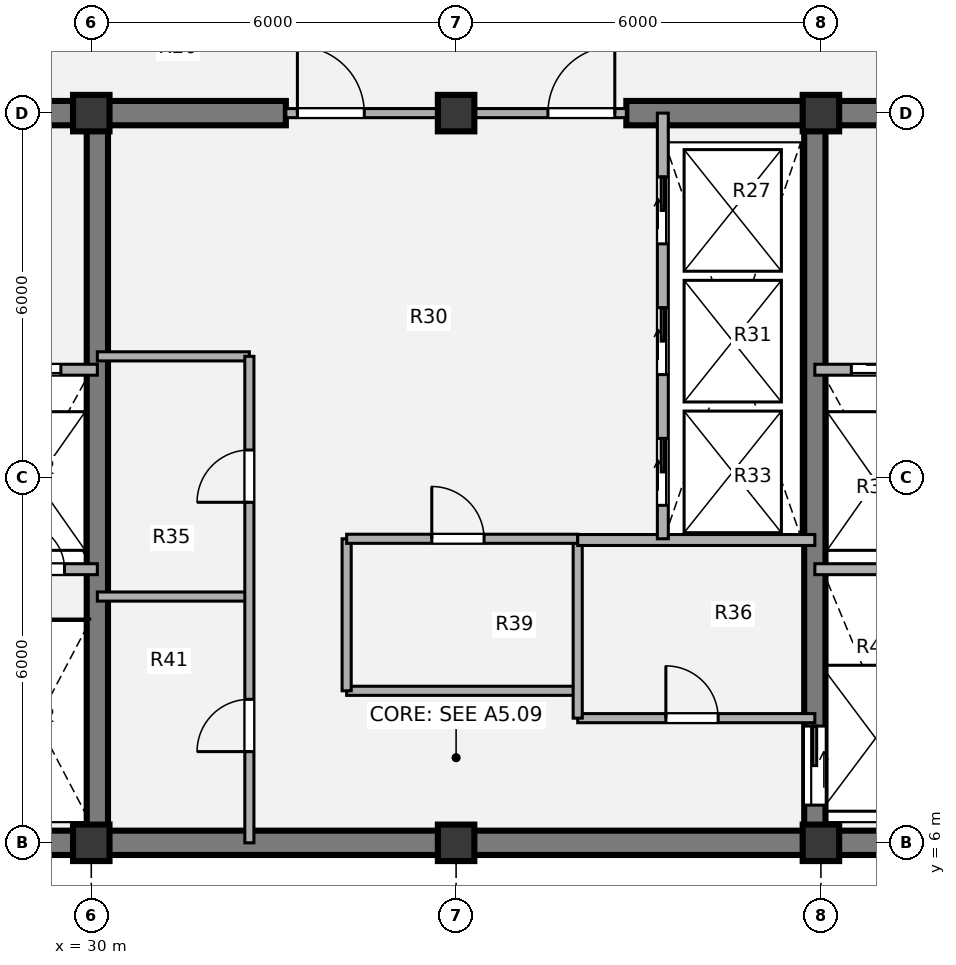
"""IFC4 building model, lengths in metres.
Left out: names, types, materials, properties, quantities, classifications, styles, units other than length and angle.
Written with IfcOpenShell. Run it as: python <this file> out.ifc"""

import sys

from ifc_helpers import new_model, si_unit, direction, frame, frame_2d, origin, origin_2d, place, context, subcontext, project, spatial, rectangle, extrude, source, transform, mapped, element, fill, save


model = new_model("IFC4")
c1 = context("Model", 3, precision=1e-05, world=origin(), true_north=direction((0.0, 1.0)))
c2 = subcontext(c1, "Body", "Model", "MODEL_VIEW")
j1 = project(units=[si_unit("LENGTHUNIT", "METRE"), si_unit("PLANEANGLEUNIT", "RADIAN")], contexts=[c1])
p1 = place(None, origin())
s1 = spatial("IfcSite", under=j1, at=p1, CompositionType="ELEMENT")
p2 = place(p1, origin())
s2 = spatial("IfcBuilding", under=s1, at=p2, CompositionType="ELEMENT")
p3 = place(p2, frame((0.0, 0.0, 234.36)))
s3 = spatial("IfcBuildingStorey", under=s2, at=p3, CompositionType="ELEMENT", Elevation=234.36)
m1 = source(origin(), c2, "Body", "SweptSolid", [
    extrude(rectangle(XDim=0.6, YDim=0.6, at=origin_2d()), origin(), (0.0, 0.0, 1.0), 3.78),
])
for number, where, z_axis, x_axis in (
    (1, (30.0, 6.0, 0.0), (0.0, 0.0, 1.0), (1.0, 0.0, 0.0)),
    (2, (36.0, 6.0, 0.0), (0.0, 0.0, 1.0), (1.0, 0.0, 0.0)),
    (3, (42.0, 6.0, 0.0), (0.0, 0.0, 1.0), (1.0, 0.0, 0.0)),
    (4, (30.0, 18.0, 0.0), (0.0, 0.0, 1.0), (1.0, 0.0, 0.0)),
    (5, (36.0, 18.0, 0.0), (0.0, 0.0, 1.0), (1.0, 0.0, 0.0)),
    (6, (42.0, 18.0, 0.0), (0.0, 0.0, 1.0), (1.0, 0.0, 0.0)),
):
    element("IfcColumn", number, at=place(p3, frame(where, z_axis=z_axis, x_axis=x_axis)), inside=s3, PredefinedType="COLUMN", context=c2, shape_type="MappedRepresentation", body=[
        mapped(m1, transform((0.0, 0.0, 0.0), x_axis=(1.0, 0.0, 0.0), y_axis=(0.0, 1.0, 0.0), z_axis=(0.0, 0.0, 1.0), scale=1.0)),
    ])
p4 = place(p3, frame((48.2, 6.0, 0.0), z_axis=(0.0, 0.0, 1.0), x_axis=(-1.0, 0.0, 0.0)))
e7 = element("IfcWall", 7, at=p4, inside=s3, PredefinedType="SHEAR", context=c2, shape_type="SweptSolid", body=[
    extrude(rectangle(XDim=24.4, YDim=0.4, at=frame_2d((12.2, 0.0))), origin(), (0.0, 0.0, 1.0), 3.78),
])
p5 = place(p3, frame((23.8, 18.0, 0.0), z_axis=(0.0, 0.0, 1.0), x_axis=(1.0, 0.0, 0.0)))
e8 = element("IfcWall", 8, at=p5, inside=s3, PredefinedType="SHEAR", context=c2, shape_type="SweptSolid", body=[
    extrude(rectangle(XDim=9.4, YDim=0.4, at=frame_2d((4.7, 0.0))), origin(), (0.0, 0.0, 1.0), 3.78),
])
p6 = place(p5, frame((2.95, 0.0, 0.0)))
e9 = element("IfcOpeningElement", 9, at=p6, cuts=e8, PredefinedType="OPENING", context=c2, shape_type="SweptSolid", body=[
    extrude(rectangle(XDim=1.1, YDim=2.1, at=origin_2d()), frame((0.55, 0.21, 1.05), z_axis=(0.0, -1.0, 0.0), x_axis=(1.0, 0.0, 0.0)), (0.0, 0.0, 1.0), 0.42),
])
p7 = place(p3, frame((38.8, 18.0, 0.0), z_axis=(0.0, 0.0, 1.0), x_axis=(1.0, 0.0, 0.0)))
e10 = element("IfcWall", 10, at=p7, inside=s3, PredefinedType="SHEAR", context=c2, shape_type="SweptSolid", body=[
    extrude(rectangle(XDim=9.4, YDim=0.4, at=frame_2d((4.7, 0.0))), origin(), (0.0, 0.0, 1.0), 3.78),
])
p8 = place(p7, frame((5.45, 0.0, 0.0)))
e11 = element("IfcOpeningElement", 11, at=p8, cuts=e10, PredefinedType="OPENING", context=c2, shape_type="SweptSolid", body=[
    extrude(rectangle(XDim=1.1, YDim=2.1, at=origin_2d()), frame((0.55, 0.21, 1.05), z_axis=(0.0, -1.0, 0.0), x_axis=(1.0, 0.0, 0.0)), (0.0, 0.0, 1.0), 0.42),
])
p9 = place(p3, frame((30.1, 6.0, 0.0), z_axis=(0.0, 0.0, 1.0), x_axis=(0.0, 1.0, 0.0)))
e12 = element("IfcWall", 12, at=p9, inside=s3, PredefinedType="SHEAR", context=c2, shape_type="SweptSolid", body=[
    extrude(rectangle(XDim=12.0, YDim=0.35, at=frame_2d((6.0, 0.0))), origin(), (0.0, 0.0, 1.0), 3.78),
])
p10 = place(p3, frame((41.9, 18.0, 0.0), z_axis=(0.0, 0.0, 1.0), x_axis=(0.0, -1.0, 0.0)))
e13 = element("IfcWall", 13, at=p10, inside=s3, PredefinedType="SHEAR", context=c2, shape_type="SweptSolid", body=[
    extrude(rectangle(XDim=12.0, YDim=0.35, at=frame_2d((6.0, 0.0))), origin(), (0.0, 0.0, 1.0), 3.78),
])
p11 = place(p10, frame((10.08, 0.0, 0.0)))
e14 = element("IfcOpeningElement", 14, at=p11, cuts=e13, PredefinedType="OPENING", context=c2, shape_type="SweptSolid", body=[
    extrude(rectangle(XDim=1.3, YDim=2.1, at=origin_2d()), frame((0.65, 0.185, 1.05), z_axis=(0.0, -1.0, 0.0), x_axis=(1.0, 0.0, 0.0)), (0.0, 0.0, 1.0), 0.37),
])
p12 = place(p3, frame((30.1, 14.0, 0.0), z_axis=(0.0, 0.0, 1.0), x_axis=(1.0, 0.0, 0.0)))
e15 = element("IfcWall", 15, at=p12, inside=s3, PredefinedType="PARTITIONING", context=c2, shape_type="SweptSolid", body=[
    extrude(rectangle(XDim=2.5, YDim=0.15, at=frame_2d((1.25, 0.0))), origin(), (0.0, 0.0, 1.0), 3.5),
])
p13 = place(p3, frame((34.2, 8.5, 0.0), z_axis=(0.0, 0.0, 1.0), x_axis=(1.0, 0.0, 0.0)))
e16 = element("IfcWall", 16, at=p13, inside=s3, PredefinedType="PARTITIONING", context=c2, shape_type="SweptSolid", body=[
    extrude(rectangle(XDim=3.8, YDim=0.15, at=frame_2d((1.9, 0.0))), origin(), (0.0, 0.0, 1.0), 3.5),
])
p14 = place(p3, frame((38.0, 8.05, 0.0), z_axis=(0.0, 0.0, 1.0), x_axis=(1.0, 0.0, 0.0)))
e17 = element("IfcWall", 17, at=p14, inside=s3, PredefinedType="PARTITIONING", context=c2, shape_type="SweptSolid", body=[
    extrude(rectangle(XDim=3.9, YDim=0.15, at=frame_2d((1.95, 0.0))), origin(), (0.0, 0.0, 1.0), 3.5),
])
p15 = place(p14, frame((1.45, 0.0, 0.0)))
e18 = element("IfcOpeningElement", 18, at=p15, cuts=e17, PredefinedType="OPENING", context=c2, shape_type="SweptSolid", body=[
    extrude(rectangle(XDim=0.86, YDim=2.1, at=origin_2d()), frame((0.43, 0.085, 1.05), z_axis=(0.0, -1.0, 0.0), x_axis=(1.0, 0.0, 0.0)), (0.0, 0.0, 1.0), 0.17),
])
p16 = place(p3, frame((34.2, 8.5, 0.0), z_axis=(0.0, 0.0, 1.0), x_axis=(0.0, 1.0, 0.0)))
e19 = element("IfcWall", 19, at=p16, inside=s3, PredefinedType="PARTITIONING", context=c2, shape_type="SweptSolid", body=[
    extrude(rectangle(XDim=2.5, YDim=0.15, at=frame_2d((1.25, 0.0))), origin(), (0.0, 0.0, 1.0), 3.5),
])
p17 = place(p3, frame((38.0, 8.05, 0.0), z_axis=(0.0, 0.0, 1.0), x_axis=(0.0, 1.0, 0.0)))
e20 = element("IfcWall", 20, at=p17, inside=s3, PredefinedType="PARTITIONING", context=c2, shape_type="SweptSolid", body=[
    extrude(rectangle(XDim=2.95, YDim=0.15, at=frame_2d((1.475, 0.0))), origin(), (0.0, 0.0, 1.0), 3.5),
])
p18 = place(p3, frame((34.2, 11.0, 0.0), z_axis=(0.0, 0.0, 1.0), x_axis=(1.0, 0.0, 0.0)))
e21 = element("IfcWall", 21, at=p18, inside=s3, PredefinedType="PARTITIONING", context=c2, shape_type="SweptSolid", body=[
    extrude(rectangle(XDim=3.8, YDim=0.15, at=frame_2d((1.9, 0.0))), origin(), (0.0, 0.0, 1.0), 3.5),
])
p19 = place(p18, frame((1.4, 0.0, 0.0)))
e22 = element("IfcOpeningElement", 22, at=p19, cuts=e21, PredefinedType="OPENING", context=c2, shape_type="SweptSolid", body=[
    extrude(rectangle(XDim=0.86, YDim=2.1, at=origin_2d()), frame((0.43, 0.085, 1.05), z_axis=(0.0, -1.0, 0.0), x_axis=(1.0, 0.0, 0.0)), (0.0, 0.0, 1.0), 0.17),
])
p20 = place(p3, frame((38.0, 10.98, 0.0), z_axis=(0.0, 0.0, 1.0), x_axis=(1.0, 0.0, 0.0)))
e23 = element("IfcWall", 23, at=p20, inside=s3, PredefinedType="PARTITIONING", context=c2, shape_type="SweptSolid", body=[
    extrude(rectangle(XDim=3.9, YDim=0.18, at=frame_2d((1.95, 0.0))), origin(), (0.0, 0.0, 1.0), 3.5),
])
p21 = place(p3, frame((30.1, 10.05, 0.0), z_axis=(0.0, 0.0, 1.0), x_axis=(1.0, 0.0, 0.0)))
e24 = element("IfcWall", 24, at=p21, inside=s3, PredefinedType="PARTITIONING", context=c2, shape_type="SweptSolid", body=[
    extrude(rectangle(XDim=2.5, YDim=0.15, at=frame_2d((1.25, 0.0))), origin(), (0.0, 0.0, 1.0), 3.5),
])
p22 = place(p3, frame((32.6, 6.0, 0.0), z_axis=(0.0, 0.0, 1.0), x_axis=(0.0, 1.0, 0.0)))
e25 = element("IfcWall", 25, at=p22, inside=s3, PredefinedType="PARTITIONING", context=c2, shape_type="SweptSolid", body=[
    extrude(rectangle(XDim=8.0, YDim=0.15, at=frame_2d((4.0, 0.0))), origin(), (0.0, 0.0, 1.0), 3.5),
])
p23 = place(p22, frame((1.5, 0.0, 0.0)))
e26 = element("IfcOpeningElement", 26, at=p23, cuts=e25, PredefinedType="OPENING", context=c2, shape_type="SweptSolid", body=[
    extrude(rectangle(XDim=0.86, YDim=2.1, at=origin_2d()), frame((0.43, 0.085, 1.05), z_axis=(0.0, -1.0, 0.0), x_axis=(1.0, 0.0, 0.0)), (0.0, 0.0, 1.0), 0.17),
])
p24 = place(p22, frame((5.6, 0.0, 0.0)))
e27 = element("IfcOpeningElement", 27, at=p24, cuts=e25, PredefinedType="OPENING", context=c2, shape_type="SweptSolid", body=[
    extrude(rectangle(XDim=0.86, YDim=2.1, at=origin_2d()), frame((0.43, 0.085, 1.05), z_axis=(0.0, -1.0, 0.0), x_axis=(1.0, 0.0, 0.0)), (0.0, 0.0, 1.0), 0.17),
])
p25 = place(p3, frame((33.2, 18.0, 0.0), z_axis=(0.0, 0.0, 1.0), x_axis=(1.0, 0.0, 0.0)))
e28 = element("IfcWall", 28, at=p25, inside=s3, PredefinedType="PARTITIONING", context=c2, shape_type="SweptSolid", body=[
    extrude(rectangle(XDim=5.6, YDim=0.15, at=frame_2d((2.8, 0.0))), origin(), (0.0, 0.0, 1.0), 2.515),
])
p26 = place(p25, frame((0.19, 0.0, 0.0)))
e29 = element("IfcOpeningElement", 29, at=p26, cuts=e28, PredefinedType="OPENING", context=c2, shape_type="SweptSolid", body=[
    extrude(rectangle(XDim=1.1, YDim=2.1, at=origin_2d()), frame((0.55, 0.085, 1.05), z_axis=(0.0, -1.0, 0.0), x_axis=(1.0, 0.0, 0.0)), (0.0, 0.0, 1.0), 0.17),
])
p27 = place(p25, frame((4.31, 0.0, 0.0)))
e30 = element("IfcOpeningElement", 30, at=p27, cuts=e28, PredefinedType="OPENING", context=c2, shape_type="SweptSolid", body=[
    extrude(rectangle(XDim=1.1, YDim=2.1, at=origin_2d()), frame((0.55, 0.085, 1.05), z_axis=(0.0, -1.0, 0.0), x_axis=(1.0, 0.0, 0.0)), (0.0, 0.0, 1.0), 0.17),
])
p28 = place(p3, frame((24.0, 13.78, 0.0), z_axis=(0.0, 0.0, 1.0), x_axis=(1.0, 0.0, 0.0)))
e31 = element("IfcWall", 31, at=p28, inside=s3, PredefinedType="PARTITIONING", context=c2, shape_type="SweptSolid", body=[
    extrude(rectangle(XDim=6.1, YDim=0.18, at=frame_2d((3.05, 0.0))), origin(), (0.0, 0.0, 1.0), 3.5),
])
p29 = place(p28, frame((1.15, 0.0, 0.0)))
e32 = element("IfcOpeningElement", 32, at=p29, cuts=e31, PredefinedType="OPENING", context=c2, shape_type="SweptSolid", body=[
    extrude(rectangle(XDim=1.1, YDim=2.1, at=origin_2d()), frame((0.55, 0.1, 1.05), z_axis=(0.0, -1.0, 0.0), x_axis=(1.0, 0.0, 0.0)), (0.0, 0.0, 1.0), 0.2),
])
p30 = place(p28, frame((4.4, 0.0, 0.0)))
e33 = element("IfcOpeningElement", 33, at=p30, cuts=e31, PredefinedType="OPENING", context=c2, shape_type="SweptSolid", body=[
    extrude(rectangle(XDim=1.1, YDim=2.1, at=origin_2d()), frame((0.55, 0.1, 1.05), z_axis=(0.0, -1.0, 0.0), x_axis=(1.0, 0.0, 0.0)), (0.0, 0.0, 1.0), 0.2),
])
p31 = place(p3, frame((28.15, 10.5, 0.0), z_axis=(0.0, 0.0, 1.0), x_axis=(1.0, 0.0, 0.0)))
e34 = element("IfcWall", 34, at=p31, inside=s3, PredefinedType="PARTITIONING", context=c2, shape_type="SweptSolid", body=[
    extrude(rectangle(XDim=1.95, YDim=0.18, at=frame_2d((0.975, 0.0))), origin(), (0.0, 0.0, 1.0), 3.5),
])
p32 = place(p31, frame((0.65, 0.0, 0.0)))
e35 = element("IfcOpeningElement", 35, at=p32, cuts=e34, PredefinedType="OPENING", context=c2, shape_type="SweptSolid", body=[
    extrude(rectangle(XDim=0.76, YDim=2.05, at=origin_2d()), frame((0.38, 0.1, 1.025), z_axis=(0.0, -1.0, 0.0), x_axis=(1.0, 0.0, 0.0)), (0.0, 0.0, 1.0), 0.2),
])
p33 = place(p3, frame((41.9, 13.78, 0.0), z_axis=(0.0, 0.0, 1.0), x_axis=(1.0, 0.0, 0.0)))
e36 = element("IfcWall", 36, at=p33, inside=s3, PredefinedType="PARTITIONING", context=c2, shape_type="SweptSolid", body=[
    extrude(rectangle(XDim=6.1, YDim=0.18, at=frame_2d((3.05, 0.0))), origin(), (0.0, 0.0, 1.0), 3.5),
])
p34 = place(p33, frame((0.6, 0.0, 0.0)))
e37 = element("IfcOpeningElement", 37, at=p34, cuts=e36, PredefinedType="OPENING", context=c2, shape_type="SweptSolid", body=[
    extrude(rectangle(XDim=1.1, YDim=2.1, at=origin_2d()), frame((0.55, 0.1, 1.05), z_axis=(0.0, -1.0, 0.0), x_axis=(1.0, 0.0, 0.0)), (0.0, 0.0, 1.0), 0.2),
])
p35 = place(p33, frame((3.8, 0.0, 0.0)))
e38 = element("IfcOpeningElement", 38, at=p35, cuts=e36, PredefinedType="OPENING", context=c2, shape_type="SweptSolid", body=[
    extrude(rectangle(XDim=1.1, YDim=2.1, at=origin_2d()), frame((0.55, 0.1, 1.05), z_axis=(0.0, -1.0, 0.0), x_axis=(1.0, 0.0, 0.0)), (0.0, 0.0, 1.0), 0.2),
])
p36 = place(p3, frame((41.9, 10.5, 0.0), z_axis=(0.0, 0.0, 1.0), x_axis=(1.0, 0.0, 0.0)))
e39 = element("IfcWall", 39, at=p36, inside=s3, PredefinedType="PARTITIONING", context=c2, shape_type="SweptSolid", body=[
    extrude(rectangle(XDim=1.95, YDim=0.18, at=frame_2d((0.975, 0.0))), origin(), (0.0, 0.0, 1.0), 3.5),
])
p37 = place(p3, frame((39.4, 11.0, 0.0), z_axis=(0.0, 0.0, 1.0), x_axis=(0.0, 1.0, 0.0)))
e40 = element("IfcWall", 40, at=p37, inside=s3, PredefinedType="PARTITIONING", context=c2, shape_type="SweptSolid", body=[
    extrude(rectangle(XDim=7.0, YDim=0.18, at=frame_2d((3.5, 0.0))), origin(), (0.0, 0.0, 1.0), 3.5),
])
p38 = place(p37, frame((0.55, 0.0, 0.0)))
e41 = element("IfcOpeningElement", 41, at=p38, cuts=e40, PredefinedType="OPENING", context=c2, shape_type="SweptSolid", body=[
    extrude(rectangle(XDim=1.1, YDim=2.1, at=origin_2d()), frame((0.55, 0.1, 1.05), z_axis=(0.0, -1.0, 0.0), x_axis=(1.0, 0.0, 0.0)), (0.0, 0.0, 1.0), 0.2),
])
p39 = place(p37, frame((2.7, 0.0, 0.0)))
e42 = element("IfcOpeningElement", 42, at=p39, cuts=e40, PredefinedType="OPENING", context=c2, shape_type="SweptSolid", body=[
    extrude(rectangle(XDim=1.1, YDim=2.1, at=origin_2d()), frame((0.55, 0.1, 1.05), z_axis=(0.0, -1.0, 0.0), x_axis=(1.0, 0.0, 0.0)), (0.0, 0.0, 1.0), 0.2),
])
p40 = place(p37, frame((4.85, 0.0, 0.0)))
e43 = element("IfcOpeningElement", 43, at=p40, cuts=e40, PredefinedType="OPENING", context=c2, shape_type="SweptSolid", body=[
    extrude(rectangle(XDim=1.1, YDim=2.1, at=origin_2d()), frame((0.55, 0.1, 1.05), z_axis=(0.0, -1.0, 0.0), x_axis=(1.0, 0.0, 0.0)), (0.0, 0.0, 1.0), 0.2),
])
m2 = source(origin(), c2, "Body", "SweptSolid", [
    extrude(rectangle(XDim=0.86, YDim=2.1, at=origin_2d()), frame((0.43, 0.025, 1.05), z_axis=(0.0, -1.0, 0.0), x_axis=(1.0, 0.0, 0.0)), (0.0, 0.0, 1.0), 0.05),
])
p41 = place(p15, origin())
e44 = element("IfcDoor", 44, at=p41, inside=s3, OperationType="SINGLE_SWING_LEFT", PredefinedType="DOOR", context=c2, shape_type="MappedRepresentation", body=[
    mapped(m2, transform((0.0, 0.0, 0.0), x_axis=(1.0, 0.0, 0.0), y_axis=(0.0, 1.0, 0.0), z_axis=(0.0, 0.0, 1.0), scale=1.0)),
])
fill(e18, e44)
p42 = place(p19, origin())
e45 = element("IfcDoor", 45, at=p42, inside=s3, OperationType="SINGLE_SWING_LEFT", PredefinedType="DOOR", context=c2, shape_type="MappedRepresentation", body=[
    mapped(m2, transform((0.0, 0.0, 0.0), x_axis=(1.0, 0.0, 0.0), y_axis=(0.0, 1.0, 0.0), z_axis=(0.0, 0.0, 1.0), scale=1.0)),
])
fill(e22, e45)
p43 = place(p23, origin())
e46 = element("IfcDoor", 46, at=p43, inside=s3, OperationType="SINGLE_SWING_LEFT", PredefinedType="DOOR", context=c2, shape_type="MappedRepresentation", body=[
    mapped(m2, transform((0.0, 0.0, 0.0), x_axis=(1.0, 0.0, 0.0), y_axis=(0.0, 1.0, 0.0), z_axis=(0.0, 0.0, 1.0), scale=1.0)),
])
fill(e26, e46)
p44 = place(p24, origin())
e47 = element("IfcDoor", 47, at=p44, inside=s3, OperationType="SINGLE_SWING_LEFT", PredefinedType="DOOR", context=c2, shape_type="MappedRepresentation", body=[
    mapped(m2, transform((0.0, 0.0, 0.0), x_axis=(1.0, 0.0, 0.0), y_axis=(0.0, 1.0, 0.0), z_axis=(0.0, 0.0, 1.0), scale=1.0)),
])
fill(e27, e47)
m3 = source(origin(), c2, "Body", "SweptSolid", [
    extrude(rectangle(XDim=1.1, YDim=2.1, at=origin_2d()), frame((0.55, 0.025, 1.05), z_axis=(0.0, -1.0, 0.0), x_axis=(1.0, 0.0, 0.0)), (0.0, 0.0, 1.0), 0.05),
])
p45 = place(p26, origin())
e48 = element("IfcDoor", 48, at=p45, inside=s3, OperationType="SINGLE_SWING_LEFT", PredefinedType="DOOR", context=c2, shape_type="MappedRepresentation", body=[
    mapped(m3, transform((0.0, 0.0, 0.0), x_axis=(1.0, 0.0, 0.0), y_axis=(0.0, 1.0, 0.0), z_axis=(0.0, 0.0, 1.0), scale=1.0)),
])
fill(e29, e48)
p46 = place(p27, origin())
e49 = element("IfcDoor", 49, at=p46, inside=s3, OperationType="SINGLE_SWING_RIGHT", PredefinedType="DOOR", context=c2, shape_type="MappedRepresentation", body=[
    mapped(m3, transform((0.0, 0.0, 0.0), x_axis=(1.0, 0.0, 0.0), y_axis=(0.0, 1.0, 0.0), z_axis=(0.0, 0.0, 1.0), scale=1.0)),
])
fill(e30, e49)
m4 = source(origin(), c2, "Body", "SweptSolid", [
    extrude(rectangle(XDim=1.1, YDim=2.1, at=origin_2d()), frame((0.55, 0.025, 1.05), z_axis=(0.0, -1.0, 0.0), x_axis=(1.0, 0.0, 0.0)), (0.0, 0.0, 1.0), 0.05),
])
p47 = place(p30, origin())
e50 = element("IfcDoor", 50, at=p47, inside=s3, OperationType="SLIDING_TO_LEFT", PredefinedType="DOOR", context=c2, shape_type="MappedRepresentation", body=[
    mapped(m4, transform((0.0, 0.0, 0.0), x_axis=(1.0, 0.0, 0.0), y_axis=(0.0, 1.0, 0.0), z_axis=(0.0, 0.0, 1.0), scale=1.0)),
])
fill(e33, e50)
m5 = source(origin(), c2, "Body", "SweptSolid", [
    extrude(rectangle(XDim=0.76, YDim=2.05, at=origin_2d()), frame((0.38, 0.025, 1.025), z_axis=(0.0, -1.0, 0.0), x_axis=(1.0, 0.0, 0.0)), (0.0, 0.0, 1.0), 0.05),
])
p48 = place(p32, origin())
e51 = element("IfcDoor", 51, at=p48, inside=s3, OperationType="SINGLE_SWING_LEFT", PredefinedType="DOOR", context=c2, shape_type="MappedRepresentation", body=[
    mapped(m5, transform((0.0, 0.0, 0.0), x_axis=(1.0, 0.0, 0.0), y_axis=(0.0, 1.0, 0.0), z_axis=(0.0, 0.0, 1.0), scale=1.0)),
])
fill(e35, e51)
p49 = place(p34, origin())
e52 = element("IfcDoor", 52, at=p49, inside=s3, OperationType="SLIDING_TO_RIGHT", PredefinedType="DOOR", context=c2, shape_type="MappedRepresentation", body=[
    mapped(m4, transform((0.0, 0.0, 0.0), x_axis=(1.0, 0.0, 0.0), y_axis=(0.0, 1.0, 0.0), z_axis=(0.0, 0.0, 1.0), scale=1.0)),
])
fill(e37, e52)
m6 = source(origin(), c2, "Body", "SweptSolid", [
    extrude(rectangle(XDim=1.3, YDim=2.1, at=origin_2d()), frame((0.65, 0.025, 1.05), z_axis=(0.0, -1.0, 0.0), x_axis=(1.0, 0.0, 0.0)), (0.0, 0.0, 1.0), 0.05),
])
p50 = place(p11, origin())
e53 = element("IfcDoor", 53, at=p50, inside=s3, OperationType="SLIDING_TO_LEFT", PredefinedType="DOOR", context=c2, shape_type="MappedRepresentation", body=[
    mapped(m6, transform((0.0, 0.0, 0.0), x_axis=(1.0, 0.0, 0.0), y_axis=(0.0, 1.0, 0.0), z_axis=(0.0, 0.0, 1.0), scale=1.0)),
])
fill(e14, e53)
p51 = place(p38, origin())
e54 = element("IfcDoor", 54, at=p51, inside=s3, OperationType="SLIDING_TO_RIGHT", PredefinedType="DOOR", context=c2, shape_type="MappedRepresentation", body=[
    mapped(m4, transform((0.0, 0.0, 0.0), x_axis=(1.0, 0.0, 0.0), y_axis=(0.0, 1.0, 0.0), z_axis=(0.0, 0.0, 1.0), scale=1.0)),
])
fill(e41, e54)
p52 = place(p39, origin())
e55 = element("IfcDoor", 55, at=p52, inside=s3, OperationType="SLIDING_TO_RIGHT", PredefinedType="DOOR", context=c2, shape_type="MappedRepresentation", body=[
    mapped(m4, transform((0.0, 0.0, 0.0), x_axis=(1.0, 0.0, 0.0), y_axis=(0.0, 1.0, 0.0), z_axis=(0.0, 0.0, 1.0), scale=1.0)),
])
fill(e42, e55)
p53 = place(p40, origin())
e56 = element("IfcDoor", 56, at=p53, inside=s3, OperationType="SLIDING_TO_RIGHT", PredefinedType="DOOR", context=c2, shape_type="MappedRepresentation", body=[
    mapped(m4, transform((0.0, 0.0, 0.0), x_axis=(1.0, 0.0, 0.0), y_axis=(0.0, 1.0, 0.0), z_axis=(0.0, 0.0, 1.0), scale=1.0)),
])
fill(e43, e56)
save(model, sys.argv[1])
